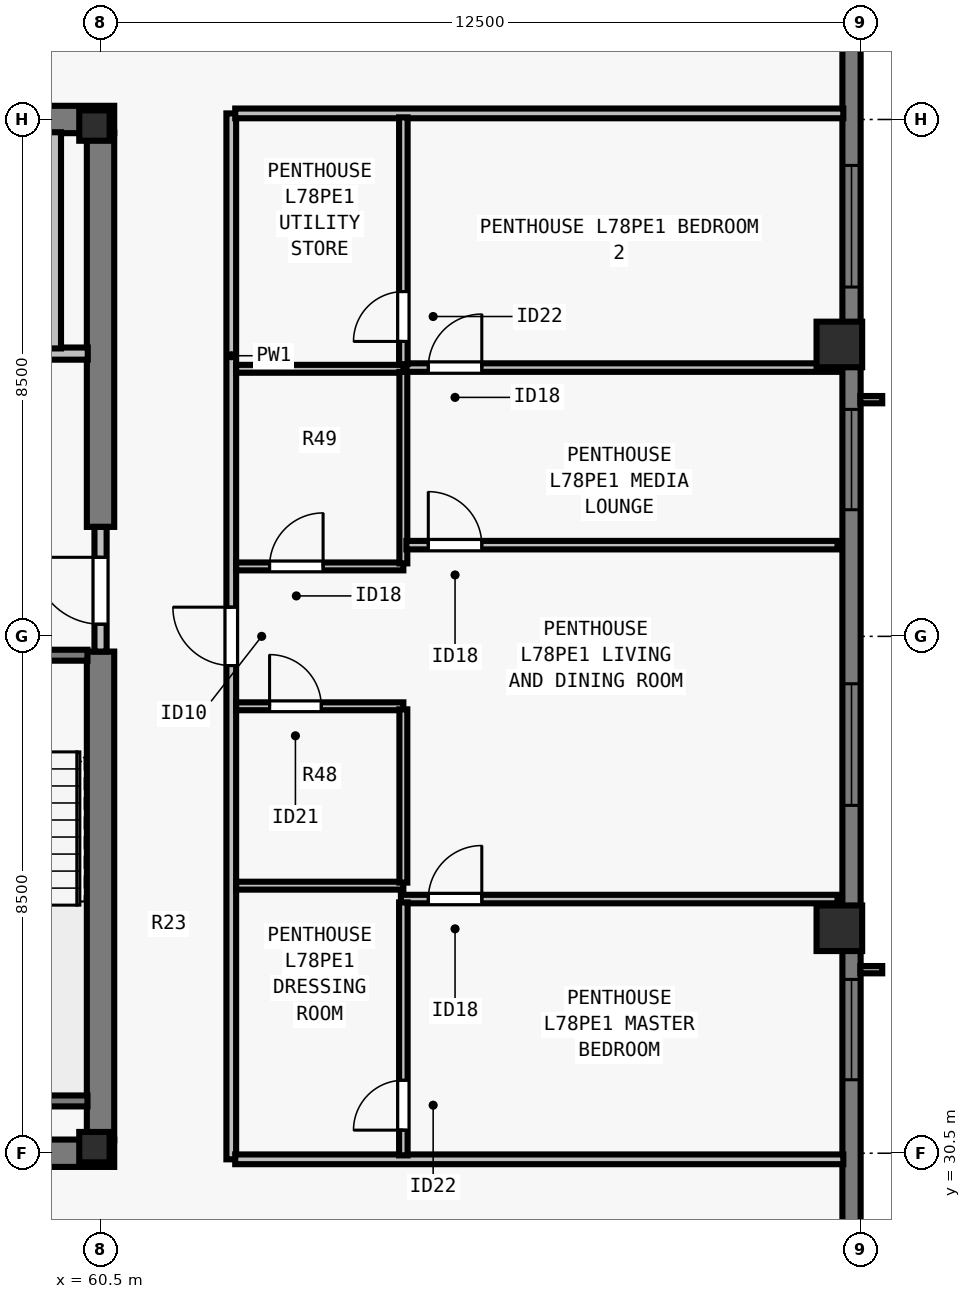
"""IFC4 building model, lengths in metres.
Left out: names, types, materials, properties, quantities, classifications, styles, units other than length and angle.
Written with IfcOpenShell. Run it as: python <this file> out.ifc"""

import sys

from ifc_helpers import new_model, si_unit, direction, frame, frame_2d, origin, origin_2d, place, context, subcontext, project, spatial, rectangle, i_section, extrude, element, fill, save


model = new_model("IFC4")
c1 = context("Model", 3, precision=1e-05, world=origin(), true_north=direction((0.0, 1.0)))
c2 = subcontext(c1, "Body", "Model", "MODEL_VIEW")
j1 = project(units=[si_unit("LENGTHUNIT", "METRE"), si_unit("PLANEANGLEUNIT", "RADIAN")], contexts=[c1])
p1 = place(None, origin())
s1 = spatial("IfcSite", under=j1, at=p1, CompositionType="ELEMENT")
p2 = place(p1, origin())
s2 = spatial("IfcBuilding", under=s1, at=p2, CompositionType="ELEMENT")
p3 = place(p2, frame((0.0, 0.0, 284.0)))
s3 = spatial("IfcBuildingStorey", under=s2, at=p3, CompositionType="ELEMENT", Elevation=284.0)
for number, where, z_axis, x_axis in (
    (1, (60.4, 30.6, 0.0), (0.0, 0.0, 1.0), (1.0, 0.0, 0.0)),
    (2, (60.4, 47.4, 0.0), (0.0, 0.0, 1.0), (1.0, 0.0, 0.0)),
):
    element("IfcColumn", number, at=place(p3, frame(where, z_axis=z_axis, x_axis=x_axis)), inside=s3, PredefinedType="COLUMN", context=c2, shape_type="SweptSolid", body=[
        extrude(i_section(OverallWidth=0.5, OverallDepth=0.5, WebThickness=0.028, FlangeThickness=0.045, at=origin_2d()), origin(), (0.0, 0.0, 1.0), 3.5),
    ])
for number, where, z_axis, x_axis in (
    (3, (72.65, 34.2, 0.0), (0.0, 0.0, 1.0), (0.0, 1.0, 0.0)),
    (4, (72.65, 43.8, 0.0), (0.0, 0.0, 1.0), (0.0, 1.0, 0.0)),
):
    element("IfcColumn", number, at=place(p3, frame(where, z_axis=z_axis, x_axis=x_axis)), inside=s3, PredefinedType="COLUMN", context=c2, shape_type="SweptSolid", body=[
        extrude(rectangle(XDim=0.75, YDim=0.75, at=origin_2d()), origin(), (0.0, 0.0, 1.0), 3.5),
    ])
p4 = place(p3, frame((72.85, 54.5, 0.0), z_axis=(0.0, 0.0, 1.0), x_axis=(0.0, -1.0, 0.0)))
e5 = element("IfcWall", 5, at=p4, inside=s3, PredefinedType="SOLIDWALL", context=c2, shape_type="SweptSolid", body=[
    extrude(rectangle(XDim=30.722, YDim=0.3, at=frame_2d((15.361, 0.0))), origin(), (0.0, 0.0, 1.0), 3.29),
])
p5 = place(p4, frame((7.756, 0.0, 0.8)))
e6 = element("IfcOpeningElement", 6, at=p5, cuts=e5, PredefinedType="OPENING", context=c2, shape_type="SweptSolid", body=[
    extrude(rectangle(XDim=2.0, YDim=1.758, at=frame_2d((1.0, 0.879))), frame((0.0, 0.16, 0.0), z_axis=(0.0, -1.0, 0.0), x_axis=(1.0, 0.0, 0.0)), (0.0, 0.0, 1.0), 0.32),
])
p6 = place(p4, frame((11.768, 0.0, 0.8)))
e7 = element("IfcOpeningElement", 7, at=p6, cuts=e5, PredefinedType="OPENING", context=c2, shape_type="SweptSolid", body=[
    extrude(rectangle(XDim=1.65, YDim=1.758, at=frame_2d((0.825, 0.879))), frame((0.0, 0.16, 0.0), z_axis=(0.0, -1.0, 0.0), x_axis=(1.0, 0.0, 0.0)), (0.0, 0.0, 1.0), 0.32),
])
p7 = place(p4, frame((16.28, 0.0, 0.8)))
e8 = element("IfcOpeningElement", 8, at=p7, cuts=e5, PredefinedType="OPENING", context=c2, shape_type="SweptSolid", body=[
    extrude(rectangle(XDim=2.0, YDim=1.758, at=frame_2d((1.0, 0.879))), frame((0.0, 0.16, 0.0), z_axis=(0.0, -1.0, 0.0), x_axis=(1.0, 0.0, 0.0)), (0.0, 0.0, 1.0), 0.32),
])
p8 = place(p4, frame((21.142, 0.0, 0.8)))
e9 = element("IfcOpeningElement", 9, at=p8, cuts=e5, PredefinedType="OPENING", context=c2, shape_type="SweptSolid", body=[
    extrude(rectangle(XDim=1.65, YDim=1.758, at=frame_2d((0.825, 0.879))), frame((0.0, 0.16, 0.0), z_axis=(0.0, -1.0, 0.0), x_axis=(1.0, 0.0, 0.0)), (0.0, 0.0, 1.0), 0.32),
])
for number, where, z_axis, x_axis in (
    (10, (43.275, 30.5, 0.0), (0.0, 0.0, 1.0), (1.0, 0.0, 0.0)),
    (11, (43.275, 47.5, 0.0), (0.0, 0.0, 1.0), (1.0, 0.0, 0.0)),
):
    element("IfcWall", number, at=place(p3, frame(where, z_axis=z_axis, x_axis=x_axis)), inside=s3, PredefinedType="SHEAR", context=c2, shape_type="SweptSolid", body=[
        extrude(rectangle(XDim=17.45, YDim=0.45, at=frame_2d((8.725, 0.0))), origin(), (0.0, 0.0, 1.0), 3.29),
    ])
p9 = place(p3, frame((60.5, 30.715, 0.0), z_axis=(0.0, 0.0, 1.0), x_axis=(0.0, 1.0, 0.0)))
e12 = element("IfcWall", 12, at=p9, inside=s3, PredefinedType="SHEAR", context=c2, shape_type="SweptSolid", body=[
    extrude(rectangle(XDim=8.035, YDim=0.45, at=frame_2d((4.018, 0.0))), origin(), (0.0, 0.0, 1.0), 3.29),
])
p10 = place(p3, frame((60.5, 40.8, 0.0), z_axis=(0.0, 0.0, 1.0), x_axis=(0.0, 1.0, 0.0)))
e13 = element("IfcWall", 13, at=p10, inside=s3, PredefinedType="SHEAR", context=c2, shape_type="SweptSolid", body=[
    extrude(rectangle(XDim=6.485, YDim=0.45, at=frame_2d((3.242, 0.0))), origin(), (0.0, 0.0, 1.0), 3.29),
])
p11 = place(p3, frame((60.5, 38.75, 0.0), z_axis=(0.0, 0.0, 1.0), x_axis=(0.0, 1.0, 0.0)))
e14 = element("IfcWall", 14, at=p11, inside=s3, PredefinedType="SOLIDWALL", context=c2, shape_type="SweptSolid", body=[
    extrude(rectangle(XDim=2.05, YDim=0.2, at=frame_2d((1.025, 0.0))), origin(), (0.0, 0.0, 1.0), 3.29),
])
p12 = place(p11, frame((0.45, 0.0, 0.0)))
e15 = element("IfcOpeningElement", 15, at=p12, cuts=e14, PredefinedType="OPENING", context=c2, shape_type="SweptSolid", body=[
    extrude(rectangle(XDim=1.1, YDim=2.15, at=frame_2d((0.55, 1.075))), frame((0.0, 0.11, 0.0), z_axis=(0.0, -1.0, 0.0), x_axis=(1.0, 0.0, 0.0)), (0.0, 0.0, 1.0), 0.22),
])
p13 = place(p3, frame((56.735, 43.65, 0.0), z_axis=(0.0, 0.0, 1.0), x_axis=(1.0, 0.0, 0.0)))
e16 = element("IfcWall", 16, at=p13, inside=s3, PredefinedType="SOLIDWALL", context=c2, shape_type="SweptSolid", body=[
    extrude(rectangle(XDim=3.555, YDim=0.2, at=frame_2d((1.777, 0.0))), origin(), (0.0, 0.0, 1.0), 3.29),
])
p14 = place(p13, frame((1.295, 0.0, 0.0)))
e17 = element("IfcOpeningElement", 17, at=p14, cuts=e16, PredefinedType="OPENING", context=c2, shape_type="SweptSolid", body=[
    extrude(rectangle(XDim=1.1, YDim=2.2, at=frame_2d((0.55, 1.1))), frame((0.0, 0.11, 0.0), z_axis=(0.0, -1.0, 0.0), x_axis=(1.0, 0.0, 0.0)), (0.0, 0.0, 1.0), 0.22),
])
p15 = place(p3, frame((59.75, 43.735, 0.0), z_axis=(0.0, 0.0, 1.0), x_axis=(0.0, 1.0, 0.0)))
e18 = element("IfcWall", 18, at=p15, inside=s3, PredefinedType="SOLIDWALL", context=c2, shape_type="SweptSolid", body=[
    extrude(rectangle(XDim=3.555, YDim=0.2, at=frame_2d((1.777, 0.0))), origin(), (0.0, 0.0, 1.0), 3.29),
])
p16 = place(p3, frame((62.65, 30.4, 0.0), z_axis=(0.0, 0.0, 1.0), x_axis=(0.0, 1.0, 0.0)))
e19 = element("IfcWall", 19, at=p16, inside=s3, PredefinedType="PARTITIONING", context=c2, shape_type="SweptSolid", body=[
    extrude(rectangle(XDim=17.2, YDim=0.16, at=frame_2d((8.6, 0.0))), origin(), (0.0, 0.0, 1.0), 3.29),
])
p17 = place(p16, frame((8.12, 0.0, 0.0)))
e20 = element("IfcOpeningElement", 20, at=p17, cuts=e19, PredefinedType="OPENING", context=c2, shape_type="SweptSolid", body=[
    extrude(rectangle(XDim=0.96, YDim=2.18, at=frame_2d((0.48, 1.09))), frame((0.0, 0.09, 0.0), z_axis=(0.0, -1.0, 0.0), x_axis=(1.0, 0.0, 0.0)), (0.0, 0.0, 1.0), 0.18),
])
for number, where, z_axis, x_axis in (
    (21, (62.715, 30.4, 0.0), (0.0, 0.0, 1.0), (1.0, 0.0, 0.0)),
    (22, (62.715, 47.6, 0.0), (0.0, 0.0, 1.0), (1.0, 0.0, 0.0)),
):
    element("IfcWall", number, at=place(p3, frame(where, z_axis=z_axis, x_axis=x_axis)), inside=s3, PredefinedType="PARTITIONING", context=c2, shape_type="SweptSolid", body=[
        extrude(rectangle(XDim=10.0, YDim=0.16, at=frame_2d((5.0, 0.0))), origin(), (0.0, 0.0, 1.0), 3.29),
    ])
p18 = place(p3, frame((62.73, 34.9, 0.0), z_axis=(0.0, 0.0, 1.0), x_axis=(1.0, 0.0, 0.0)))
e23 = element("IfcWall", 23, at=p18, inside=s3, PredefinedType="PLUMBINGWALL", context=c2, shape_type="SweptSolid", body=[
    extrude(rectangle(XDim=2.75, YDim=0.13, at=frame_2d((1.375, 0.0))), origin(), (0.0, 0.0, 1.0), 3.29),
])
p19 = place(p3, frame((62.73, 37.85, 0.0), z_axis=(0.0, 0.0, 1.0), x_axis=(1.0, 0.0, 0.0)))
e24 = element("IfcWall", 24, at=p19, inside=s3, PredefinedType="PLUMBINGWALL", context=c2, shape_type="SweptSolid", body=[
    extrude(rectangle(XDim=2.75, YDim=0.13, at=frame_2d((1.375, 0.0))), origin(), (0.0, 0.0, 1.0), 3.29),
])
p20 = place(p19, frame((0.55, 0.0, 0.0)))
e25 = element("IfcOpeningElement", 25, at=p20, cuts=e24, PredefinedType="OPENING", context=c2, shape_type="SweptSolid", body=[
    extrude(rectangle(XDim=0.85, YDim=2.08, at=frame_2d((0.425, 1.04))), frame((0.0, 0.075, 0.0), z_axis=(0.0, -1.0, 0.0), x_axis=(1.0, 0.0, 0.0)), (0.0, 0.0, 1.0), 0.15),
])
p21 = place(p3, frame((65.48, 34.95, 0.0), z_axis=(0.0, 0.0, 1.0), x_axis=(0.0, 1.0, 0.0)))
e26 = element("IfcWall", 26, at=p21, inside=s3, PredefinedType="PLUMBINGWALL", context=c2, shape_type="SweptSolid", body=[
    extrude(rectangle(XDim=2.85, YDim=0.13, at=frame_2d((1.425, 0.0))), origin(), (0.0, 0.0, 1.0), 3.29),
])
p22 = place(p3, frame((62.73, 43.4, 0.0), z_axis=(0.0, 0.0, 1.0), x_axis=(1.0, 0.0, 0.0)))
e27 = element("IfcWall", 27, at=p22, inside=s3, PredefinedType="PLUMBINGWALL", context=c2, shape_type="SweptSolid", body=[
    extrude(rectangle(XDim=2.75, YDim=0.13, at=frame_2d((1.375, 0.0))), origin(), (0.0, 0.0, 1.0), 3.29),
])
p23 = place(p3, frame((62.73, 40.15, 0.0), z_axis=(0.0, 0.0, 1.0), x_axis=(1.0, 0.0, 0.0)))
e28 = element("IfcWall", 28, at=p23, inside=s3, PredefinedType="PLUMBINGWALL", context=c2, shape_type="SweptSolid", body=[
    extrude(rectangle(XDim=2.75, YDim=0.13, at=frame_2d((1.375, 0.0))), origin(), (0.0, 0.0, 1.0), 3.29),
])
p24 = place(p23, frame((0.55, 0.0, 0.0)))
e29 = element("IfcOpeningElement", 29, at=p24, cuts=e28, PredefinedType="OPENING", context=c2, shape_type="SweptSolid", body=[
    extrude(rectangle(XDim=0.88, YDim=2.1, at=frame_2d((0.44, 1.05))), frame((0.0, 0.075, 0.0), z_axis=(0.0, -1.0, 0.0), x_axis=(1.0, 0.0, 0.0)), (0.0, 0.0, 1.0), 0.15),
])
p25 = place(p3, frame((65.48, 40.2, 0.0), z_axis=(0.0, 0.0, 1.0), x_axis=(0.0, 1.0, 0.0)))
e30 = element("IfcWall", 30, at=p25, inside=s3, PredefinedType="PLUMBINGWALL", context=c2, shape_type="SweptSolid", body=[
    extrude(rectangle(XDim=3.15, YDim=0.13, at=frame_2d((1.575, 0.0))), origin(), (0.0, 0.0, 1.0), 3.29),
])
p26 = place(p3, frame((65.44, 34.68, 0.0), z_axis=(0.0, 0.0, 1.0), x_axis=(1.0, 0.0, 0.0)))
e31 = element("IfcWall", 31, at=p26, inside=s3, PredefinedType="PARTITIONING", context=c2, shape_type="SweptSolid", body=[
    extrude(rectangle(XDim=7.18, YDim=0.14, at=frame_2d((3.59, 0.0))), origin(), (0.0, 0.0, 1.0), 3.29),
])
p27 = place(p26, frame((0.45, 0.0, 0.0)))
e32 = element("IfcOpeningElement", 32, at=p27, cuts=e31, PredefinedType="OPENING", context=c2, shape_type="SweptSolid", body=[
    extrude(rectangle(XDim=0.88, YDim=2.1, at=frame_2d((0.44, 1.05))), frame((0.0, 0.08, 0.0), z_axis=(0.0, -1.0, 0.0), x_axis=(1.0, 0.0, 0.0)), (0.0, 0.0, 1.0), 0.16),
])
p28 = place(p3, frame((65.48, 30.465, 0.0), z_axis=(0.0, 0.0, 1.0), x_axis=(0.0, 1.0, 0.0)))
e33 = element("IfcWall", 33, at=p28, inside=s3, PredefinedType="PARTITIONING", context=c2, shape_type="SweptSolid", body=[
    extrude(rectangle(XDim=4.16, YDim=0.14, at=frame_2d((2.08, 0.0))), origin(), (0.0, 0.0, 1.0), 3.29),
])
p29 = place(p28, frame((0.415, 0.0, 0.0)))
e34 = element("IfcOpeningElement", 34, at=p29, cuts=e33, PredefinedType="OPENING", context=c2, shape_type="SweptSolid", body=[
    extrude(rectangle(XDim=0.82, YDim=2.1, at=frame_2d((0.41, 1.05))), frame((0.0, 0.08, 0.0), z_axis=(0.0, -1.0, 0.0), x_axis=(1.0, 0.0, 0.0)), (0.0, 0.0, 1.0), 0.16),
])
p30 = place(p3, frame((65.53, 43.42, 0.0), z_axis=(0.0, 0.0, 1.0), x_axis=(1.0, 0.0, 0.0)))
e35 = element("IfcWall", 35, at=p30, inside=s3, PredefinedType="PARTITIONING", context=c2, shape_type="SweptSolid", body=[
    extrude(rectangle(XDim=7.09, YDim=0.14, at=frame_2d((3.545, 0.0))), origin(), (0.0, 0.0, 1.0), 3.29),
])
p31 = place(p30, frame((0.36, 0.0, 0.0)))
e36 = element("IfcOpeningElement", 36, at=p31, cuts=e35, PredefinedType="OPENING", context=c2, shape_type="SweptSolid", body=[
    extrude(rectangle(XDim=0.88, YDim=2.1, at=frame_2d((0.44, 1.05))), frame((0.0, 0.08, 0.0), z_axis=(0.0, -1.0, 0.0), x_axis=(1.0, 0.0, 0.0)), (0.0, 0.0, 1.0), 0.16),
])
p32 = place(p3, frame((65.48, 43.475, 0.0), z_axis=(0.0, 0.0, 1.0), x_axis=(0.0, 1.0, 0.0)))
e37 = element("IfcWall", 37, at=p32, inside=s3, PredefinedType="PARTITIONING", context=c2, shape_type="SweptSolid", body=[
    extrude(rectangle(XDim=4.06, YDim=0.14, at=frame_2d((2.03, 0.0))), origin(), (0.0, 0.0, 1.0), 3.29),
])
p33 = place(p32, frame((0.375, 0.0, 0.0)))
e38 = element("IfcOpeningElement", 38, at=p33, cuts=e37, PredefinedType="OPENING", context=c2, shape_type="SweptSolid", body=[
    extrude(rectangle(XDim=0.82, YDim=2.1, at=frame_2d((0.41, 1.05))), frame((0.0, 0.08, 0.0), z_axis=(0.0, -1.0, 0.0), x_axis=(1.0, 0.0, 0.0)), (0.0, 0.0, 1.0), 0.16),
])
p34 = place(p3, frame((65.53, 40.5, 0.0), z_axis=(0.0, 0.0, 1.0), x_axis=(1.0, 0.0, 0.0)))
e39 = element("IfcWall", 39, at=p34, inside=s3, PredefinedType="PARTITIONING", context=c2, shape_type="SweptSolid", body=[
    extrude(rectangle(XDim=7.09, YDim=0.14, at=frame_2d((3.545, 0.0))), origin(), (0.0, 0.0, 1.0), 3.29),
])
p35 = place(p34, frame((0.36, 0.0, 0.0)))
e40 = element("IfcOpeningElement", 40, at=p35, cuts=e39, PredefinedType="OPENING", context=c2, shape_type="SweptSolid", body=[
    extrude(rectangle(XDim=0.88, YDim=2.1, at=frame_2d((0.44, 1.05))), frame((0.0, 0.08, 0.0), z_axis=(0.0, -1.0, 0.0), x_axis=(1.0, 0.0, 0.0)), (0.0, 0.0, 1.0), 0.16),
])
p36 = place(p3, frame((57.005, 38.69, 0.0), z_axis=(0.0, 0.0, 1.0), x_axis=(1.0, 0.0, 0.0)))
e41 = element("IfcWall", 41, at=p36, inside=s3, PredefinedType="SOLIDWALL", context=c2, shape_type="SweptSolid", body=[
    extrude(rectangle(XDim=3.28, YDim=0.18, at=frame_2d((1.64, 0.0))), origin(), (0.0, 0.0, 1.0), 3.29),
])
p37 = place(p36, frame((1.165, 0.0, 0.0)))
e42 = element("IfcOpeningElement", 42, at=p37, cuts=e41, PredefinedType="OPENING", context=c2, shape_type="SweptSolid", body=[
    extrude(rectangle(XDim=0.95, YDim=2.15, at=frame_2d((0.475, 1.075))), frame((0.0, 0.1, 0.0), z_axis=(0.0, -1.0, 0.0), x_axis=(1.0, 0.0, 0.0)), (0.0, 0.0, 1.0), 0.2),
])
p38 = place(p3, frame((57.005, 31.36, 0.0), z_axis=(0.0, 0.0, 1.0), x_axis=(1.0, 0.0, 0.0)))
e43 = element("IfcWall", 43, at=p38, inside=s3, PredefinedType="SOLIDWALL", context=c2, shape_type="SweptSolid", body=[
    extrude(rectangle(XDim=3.28, YDim=0.18, at=frame_2d((1.64, 0.0))), origin(), (0.0, 0.0, 1.0), 3.29),
])
p39 = place(p5, origin())
e44 = element("IfcWindow", 44, at=p39, inside=s3, PartitioningType="SINGLE_PANEL", PredefinedType="WINDOW", context=c2, shape_type="SweptSolid", body=[
    extrude(rectangle(XDim=2.0, YDim=1.758, at=frame_2d((1.0, 0.879))), frame((0.0, -0.05, 0.0), z_axis=(0.0, -1.0, 0.0), x_axis=(1.0, 0.0, 0.0)), (0.0, 0.0, 1.0), 0.06),
])
fill(e6, e44)
p40 = place(p6, origin())
e45 = element("IfcWindow", 45, at=p40, inside=s3, PartitioningType="SINGLE_PANEL", PredefinedType="WINDOW", context=c2, shape_type="SweptSolid", body=[
    extrude(rectangle(XDim=1.65, YDim=1.758, at=frame_2d((0.825, 0.879))), frame((0.0, -0.05, 0.0), z_axis=(0.0, -1.0, 0.0), x_axis=(1.0, 0.0, 0.0)), (0.0, 0.0, 1.0), 0.06),
])
fill(e7, e45)
p41 = place(p7, origin())
e46 = element("IfcWindow", 46, at=p41, inside=s3, PartitioningType="SINGLE_PANEL", PredefinedType="WINDOW", context=c2, shape_type="SweptSolid", body=[
    extrude(rectangle(XDim=2.0, YDim=1.758, at=frame_2d((1.0, 0.879))), frame((0.0, -0.05, 0.0), z_axis=(0.0, -1.0, 0.0), x_axis=(1.0, 0.0, 0.0)), (0.0, 0.0, 1.0), 0.06),
])
fill(e8, e46)
p42 = place(p8, origin())
e47 = element("IfcWindow", 47, at=p42, inside=s3, PartitioningType="SINGLE_PANEL", PredefinedType="WINDOW", context=c2, shape_type="SweptSolid", body=[
    extrude(rectangle(XDim=1.65, YDim=1.758, at=frame_2d((0.825, 0.879))), frame((0.0, -0.05, 0.0), z_axis=(0.0, -1.0, 0.0), x_axis=(1.0, 0.0, 0.0)), (0.0, 0.0, 1.0), 0.06),
])
fill(e9, e47)
p43 = place(p12, origin())
e48 = element("IfcDoor", 48, at=p43, inside=s3, OperationType="SINGLE_SWING_RIGHT", PredefinedType="DOOR", context=c2, shape_type="SweptSolid", body=[
    extrude(rectangle(XDim=1.1, YDim=2.15, at=frame_2d((0.55, 1.075))), frame((0.0, 0.025, 0.0), z_axis=(0.0, -1.0, 0.0), x_axis=(1.0, 0.0, 0.0)), (0.0, 0.0, 1.0), 0.05),
])
fill(e15, e48)
p44 = place(p20, origin())
e49 = element("IfcDoor", 49, at=p44, inside=s3, OperationType="SINGLE_SWING_LEFT", PredefinedType="DOOR", context=c2, shape_type="SweptSolid", body=[
    extrude(rectangle(XDim=0.85, YDim=2.08, at=frame_2d((0.425, 1.04))), frame((0.0, 0.025, 0.0), z_axis=(0.0, -1.0, 0.0), x_axis=(1.0, 0.0, 0.0)), (0.0, 0.0, 1.0), 0.05),
])
fill(e25, e49)
p45 = place(p24, origin())
e50 = element("IfcDoor", 50, at=p45, inside=s3, OperationType="SINGLE_SWING_RIGHT", PredefinedType="DOOR", context=c2, shape_type="SweptSolid", body=[
    extrude(rectangle(XDim=0.88, YDim=2.1, at=frame_2d((0.44, 1.05))), frame((0.0, 0.025, 0.0), z_axis=(0.0, -1.0, 0.0), x_axis=(1.0, 0.0, 0.0)), (0.0, 0.0, 1.0), 0.05),
])
fill(e29, e50)
p46 = place(p29, origin())
e51 = element("IfcDoor", 51, at=p46, inside=s3, OperationType="SINGLE_SWING_LEFT", PredefinedType="DOOR", context=c2, shape_type="SweptSolid", body=[
    extrude(rectangle(XDim=0.82, YDim=2.1, at=frame_2d((0.41, 1.05))), frame((0.0, 0.025, 0.0), z_axis=(0.0, -1.0, 0.0), x_axis=(1.0, 0.0, 0.0)), (0.0, 0.0, 1.0), 0.05),
])
fill(e34, e51)
p47 = place(p27, origin())
e52 = element("IfcDoor", 52, at=p47, inside=s3, OperationType="SINGLE_SWING_RIGHT", PredefinedType="DOOR", context=c2, shape_type="SweptSolid", body=[
    extrude(rectangle(XDim=0.88, YDim=2.1, at=frame_2d((0.44, 1.05))), frame((0.0, 0.025, 0.0), z_axis=(0.0, -1.0, 0.0), x_axis=(1.0, 0.0, 0.0)), (0.0, 0.0, 1.0), 0.05),
])
fill(e32, e52)
p48 = place(p33, origin())
e53 = element("IfcDoor", 53, at=p48, inside=s3, OperationType="SINGLE_SWING_LEFT", PredefinedType="DOOR", context=c2, shape_type="SweptSolid", body=[
    extrude(rectangle(XDim=0.82, YDim=2.1, at=frame_2d((0.41, 1.05))), frame((0.0, 0.025, 0.0), z_axis=(0.0, -1.0, 0.0), x_axis=(1.0, 0.0, 0.0)), (0.0, 0.0, 1.0), 0.05),
])
fill(e38, e53)
p49 = place(p31, origin())
e54 = element("IfcDoor", 54, at=p49, inside=s3, OperationType="SINGLE_SWING_RIGHT", PredefinedType="DOOR", context=c2, shape_type="SweptSolid", body=[
    extrude(rectangle(XDim=0.88, YDim=2.1, at=frame_2d((0.44, 1.05))), frame((0.0, 0.025, 0.0), z_axis=(0.0, -1.0, 0.0), x_axis=(1.0, 0.0, 0.0)), (0.0, 0.0, 1.0), 0.05),
])
fill(e36, e54)
p50 = place(p35, origin())
e55 = element("IfcDoor", 55, at=p50, inside=s3, OperationType="SINGLE_SWING_LEFT", PredefinedType="DOOR", context=c2, shape_type="SweptSolid", body=[
    extrude(rectangle(XDim=0.88, YDim=2.1, at=frame_2d((0.44, 1.05))), frame((0.0, 0.025, 0.0), z_axis=(0.0, -1.0, 0.0), x_axis=(1.0, 0.0, 0.0)), (0.0, 0.0, 1.0), 0.05),
])
fill(e40, e55)
p51 = place(p17, origin())
e56 = element("IfcDoor", 56, at=p51, inside=s3, OperationType="SINGLE_SWING_RIGHT", PredefinedType="DOOR", context=c2, shape_type="SweptSolid", body=[
    extrude(rectangle(XDim=0.96, YDim=2.18, at=frame_2d((0.48, 1.09))), frame((0.0, 0.025, 0.0), z_axis=(0.0, -1.0, 0.0), x_axis=(1.0, 0.0, 0.0)), (0.0, 0.0, 1.0), 0.05),
])
fill(e20, e56)
save(model, sys.argv[1])
